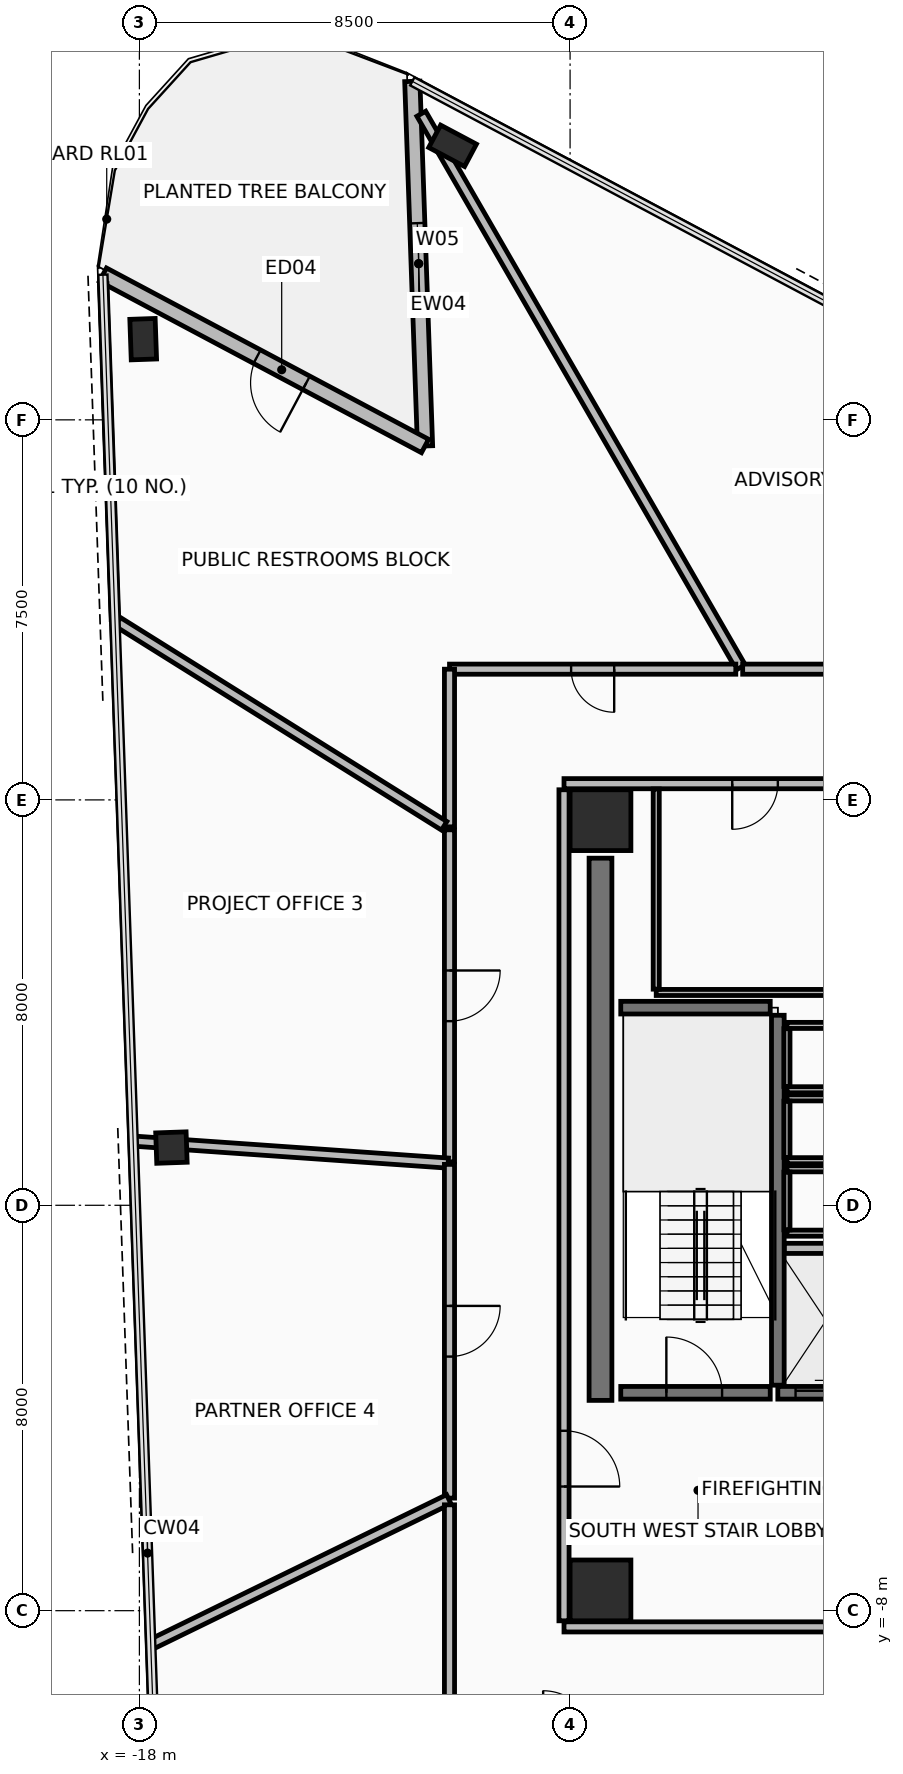
"""IFC4 building model, lengths in metres.
Left out: names, types, materials, properties, quantities, classifications, styles, units other than length and angle.
Written with IfcOpenShell. Run it as: python <this file> out.ifc"""

import sys

from ifc_helpers import new_model, si_unit, direction, frame, frame_2d, origin, origin_2d, place, context, subcontext, project, spatial, rectangle, hollow_rectangle, extrude, element, fill, save


model = new_model("IFC4")
c1 = context("Model", 3, precision=1e-05, world=origin(), true_north=direction((0.0, 1.0)))
c2 = subcontext(c1, "Body", "Model", "MODEL_VIEW")
j1 = project(units=[si_unit("LENGTHUNIT", "METRE"), si_unit("PLANEANGLEUNIT", "RADIAN")], contexts=[c1])
p1 = place(None, origin())
s1 = spatial("IfcSite", under=j1, at=p1, CompositionType="ELEMENT")
p2 = place(p1, origin())
s2 = spatial("IfcBuilding", under=s1, at=p2, CompositionType="ELEMENT")
p3 = place(p2, frame((0.0, 0.0, 149.6)))
s3 = spatial("IfcBuildingStorey", under=s2, at=p3, CompositionType="ELEMENT", Elevation=149.6)
for number, where, z_axis, x_axis in (
    (1, (-8.9, -7.6, 0.0), (0.0, 0.0, 1.0), (1.0, 0.0, 0.0)),
    (2, (-8.9, 7.6, 0.0), (0.0, 0.0, 1.0), (1.0, 0.0, 0.0)),
):
    element("IfcColumn", number, at=place(p3, frame(where, z_axis=z_axis, x_axis=x_axis)), inside=s3, PredefinedType="COLUMN", context=c2, shape_type="SweptSolid", body=[
        extrude(rectangle(XDim=1.2, YDim=1.2, at=origin_2d()), origin(), (0.0, 0.0, 1.0), 3.6),
    ])
p4 = place(p3, frame((-17.925, 17.092, 0.0), z_axis=(0.0, 0.0, 1.0), x_axis=(-0.034899496703, 0.999390827019, 0.0)))
e3 = element("IfcColumn", 3, at=p4, inside=s3, PredefinedType="COLUMN", context=c2, shape_type="SweptSolid", body=[
    extrude(hollow_rectangle(XDim=0.5, YDim=0.8, WallThickness=0.04, at=origin_2d()), origin(), (0.0, 0.0, 1.0), 3.6),
])
p5 = place(p3, frame((-17.368, 1.139, 0.0), z_axis=(0.0, 0.0, 1.0), x_axis=(-0.034899496703, 0.999390827019, 0.0)))
e4 = element("IfcColumn", 4, at=p5, inside=s3, PredefinedType="COLUMN", context=c2, shape_type="SweptSolid", body=[
    extrude(hollow_rectangle(XDim=0.6, YDim=0.6, WallThickness=0.036, at=origin_2d()), origin(), (0.0, 0.0, 1.0), 3.6),
])
p6 = place(p3, frame((-11.819, 20.908, 0.0), z_axis=(0.0, 0.0, 1.0), x_axis=(-0.88294841224, 0.469470021751, 0.0)))
e5 = element("IfcColumn", 5, at=p6, inside=s3, PredefinedType="COLUMN", context=c2, shape_type="SweptSolid", body=[
    extrude(hollow_rectangle(XDim=0.5, YDim=0.8, WallThickness=0.04, at=origin_2d()), origin(), (0.0, 0.0, 1.0), 3.6),
])
p7 = place(p3, frame((-12.614, 22.18, 0.0), z_axis=(0.0, 0.0, 1.0), x_axis=(0.034925918675, -0.999389903994, 0.0)))
e6 = element("IfcWall", 6, at=p7, inside=s3, PredefinedType="STANDARD", context=c2, shape_type="SweptSolid", body=[
    extrude(rectangle(XDim=7.2, YDim=0.3, at=frame_2d((3.6, 0.0))), origin(), (0.0, 0.0, 1.0), 2.705),
])
p8 = place(p7, frame((2.8, 0.0, 0.325)))
e7 = element("IfcOpeningElement", 7, at=p8, cuts=e6, PredefinedType="OPENING", context=c2, shape_type="SweptSolid", body=[
    extrude(rectangle(XDim=1.6, YDim=2.2, at=frame_2d((0.8, 1.1))), frame((0.0, 0.16, 0.0), z_axis=(0.0, -1.0, 0.0), x_axis=(1.0, 0.0, 0.0)), (0.0, 0.0, 1.0), 0.32),
])
p9 = place(p3, frame((-12.363, 14.984, 0.0), z_axis=(0.0, 0.0, 1.0), x_axis=(-0.882950149473, 0.469466754463, 0.0)))
e8 = element("IfcWall", 8, at=p9, inside=s3, PredefinedType="STANDARD", context=c2, shape_type="SweptSolid", body=[
    extrude(rectangle(XDim=7.2, YDim=0.3, at=frame_2d((3.6, 0.0))), origin(), (0.0, 0.0, 1.0), 2.705),
])
p10 = place(p9, frame((2.654, 0.0, 0.0)))
e9 = element("IfcOpeningElement", 9, at=p10, cuts=e8, PredefinedType="OPENING", context=c2, shape_type="SweptSolid", body=[
    extrude(rectangle(XDim=1.1, YDim=2.2, at=frame_2d((0.55, 1.1))), frame((0.0, 0.16, 0.0), z_axis=(0.0, -1.0, 0.0), x_axis=(1.0, 0.0, 0.0)), (0.0, 0.0, 1.0), 0.32),
])
p11 = place(p3, frame((-8.9, -3.85, 0.0), z_axis=(0.0, 0.0, 1.0), x_axis=(0.0, 1.0, 0.0)))
e10 = element("IfcWall", 10, at=p11, inside=s3, PredefinedType="SHEAR", context=c2, shape_type="SweptSolid", body=[
    extrude(rectangle(XDim=10.7, YDim=0.45, at=frame_2d((5.35, 0.0))), origin(), (0.0, 0.0, 1.0), 3.41),
])
p12 = place(p3, frame((-9.62, -8.32, 0.0), z_axis=(0.0, 0.0, 1.0), x_axis=(1.0, 0.0, 0.0)))
e11 = element("IfcWall", 11, at=p12, inside=s3, PredefinedType="PARTITIONING", context=c2, shape_type="SweptSolid", body=[
    extrude(rectangle(XDim=19.24, YDim=0.2, at=frame_2d((9.62, 0.0))), origin(), (0.0, 0.0, 1.0), 2.855),
])
p13 = place(p12, frame((7.37, 0.0, 0.0)))
e12 = element("IfcOpeningElement", 12, at=p13, cuts=e11, PredefinedType="OPENING", context=c2, shape_type="SweptSolid", body=[
    extrude(rectangle(XDim=0.9, YDim=2.1, at=frame_2d((0.45, 1.05))), frame((0.0, 0.11, 0.0), z_axis=(0.0, -1.0, 0.0), x_axis=(1.0, 0.0, 0.0)), (0.0, 0.0, 1.0), 0.22),
])
p14 = place(p12, frame((10.77, 0.0, 0.0)))
e13 = element("IfcOpeningElement", 13, at=p14, cuts=e11, PredefinedType="OPENING", context=c2, shape_type="SweptSolid", body=[
    extrude(rectangle(XDim=0.9, YDim=2.1, at=frame_2d((0.45, 1.05))), frame((0.0, 0.11, 0.0), z_axis=(0.0, -1.0, 0.0), x_axis=(1.0, 0.0, 0.0)), (0.0, 0.0, 1.0), 0.22),
])
p15 = place(p3, frame((9.62, 8.32, 0.0), z_axis=(0.0, 0.0, 1.0), x_axis=(-1.0, 0.0, 0.0)))
e14 = element("IfcWall", 14, at=p15, inside=s3, PredefinedType="PARTITIONING", context=c2, shape_type="SweptSolid", body=[
    extrude(rectangle(XDim=19.24, YDim=0.2, at=frame_2d((9.62, 0.0))), origin(), (0.0, 0.0, 1.0), 2.755),
])
p16 = place(p15, frame((15.02, 0.0, 0.0)))
e15 = element("IfcOpeningElement", 15, at=p16, cuts=e14, PredefinedType="OPENING", context=c2, shape_type="SweptSolid", body=[
    extrude(rectangle(XDim=0.9, YDim=2.1, at=frame_2d((0.45, 1.05))), frame((0.0, 0.11, 0.0), z_axis=(0.0, -1.0, 0.0), x_axis=(1.0, 0.0, 0.0)), (0.0, 0.0, 1.0), 0.22),
])
p17 = place(p3, frame((-9.62, 8.2, 0.0), z_axis=(0.0, 0.0, 1.0), x_axis=(0.0, -1.0, 0.0)))
e16 = element("IfcWall", 16, at=p17, inside=s3, PredefinedType="PARTITIONING", context=c2, shape_type="SweptSolid", body=[
    extrude(rectangle(XDim=16.4, YDim=0.2, at=frame_2d((8.2, 0.0))), origin(), (0.0, 0.0, 1.0), 2.855),
])
p18 = place(p17, frame((12.65, 0.0, 0.0)))
e17 = element("IfcOpeningElement", 17, at=p18, cuts=e16, PredefinedType="OPENING", context=c2, shape_type="SweptSolid", body=[
    extrude(rectangle(XDim=1.1, YDim=2.15, at=frame_2d((0.55, 1.075))), frame((0.0, 0.11, 0.0), z_axis=(0.0, -1.0, 0.0), x_axis=(1.0, 0.0, 0.0)), (0.0, 0.0, 1.0), 0.22),
])
p19 = place(p3, frame((-5.4, -3.55, 0.0), z_axis=(0.0, 0.0, 1.0), x_axis=(0.0, 1.0, 0.0)))
e18 = element("IfcWall", 18, at=p19, inside=s3, PredefinedType="SHEAR", context=c2, shape_type="SweptSolid", body=[
    extrude(rectangle(XDim=7.3, YDim=0.25, at=frame_2d((3.65, 0.0))), origin(), (0.0, 0.0, 1.0), 3.41),
])
p20 = place(p3, frame((-8.5, -3.7, 0.0), z_axis=(0.0, 0.0, 1.0), x_axis=(1.0, 0.0, 0.0)))
e19 = element("IfcWall", 19, at=p20, inside=s3, PredefinedType="SHEAR", context=c2, shape_type="SweptSolid", body=[
    extrude(rectangle(XDim=2.95, YDim=0.25, at=frame_2d((1.475, 0.0))), origin(), (0.0, 0.0, 1.0), 3.41),
])
p21 = place(p20, frame((0.9, 0.0, 0.0)))
e20 = element("IfcOpeningElement", 20, at=p21, cuts=e19, PredefinedType="OPENING", context=c2, shape_type="SweptSolid", body=[
    extrude(rectangle(XDim=1.1, YDim=2.15, at=frame_2d((0.55, 1.075))), frame((0.0, 0.135, 0.0), z_axis=(0.0, -1.0, 0.0), x_axis=(1.0, 0.0, 0.0)), (0.0, 0.0, 1.0), 0.27),
])
p22 = place(p3, frame((-8.5, 3.9, 0.0), z_axis=(0.0, 0.0, 1.0), x_axis=(1.0, 0.0, 0.0)))
e21 = element("IfcWall", 21, at=p22, inside=s3, PredefinedType="SHEAR", context=c2, shape_type="SweptSolid", body=[
    extrude(rectangle(XDim=2.95, YDim=0.25, at=frame_2d((1.475, 0.0))), origin(), (0.0, 0.0, 1.0), 3.41),
])
p23 = place(p3, frame((-5.4, -3.7, 0.0), z_axis=(0.0, 0.0, 1.0), x_axis=(1.0, 0.0, 0.0)))
e22 = element("IfcWall", 22, at=p23, inside=s3, PredefinedType="SHEAR", context=c2, shape_type="SweptSolid", body=[
    extrude(rectangle(XDim=1.9, YDim=0.25, at=frame_2d((0.95, 0.0))), origin(), (0.0, 0.0, 1.0), 3.41),
])
p24 = place(p23, frame((0.35, 0.0, 0.0)))
e23 = element("IfcOpeningElement", 23, at=p24, cuts=e22, PredefinedType="OPENING", context=c2, shape_type="SweptSolid", body=[
    extrude(rectangle(XDim=1.2, YDim=2.2, at=frame_2d((0.6, 1.1))), frame((0.0, 0.135, 0.0), z_axis=(0.0, -1.0, 0.0), x_axis=(1.0, 0.0, 0.0)), (0.0, 0.0, 1.0), 0.27),
])
p25 = place(p3, frame((-5.27, -0.85, 0.0), z_axis=(0.0, 0.0, 1.0), x_axis=(1.0, 0.0, 0.0)))
e24 = element("IfcWall", 24, at=p25, inside=s3, PredefinedType="PARTITIONING", context=c2, shape_type="SweptSolid", body=[
    extrude(rectangle(XDim=1.77, YDim=0.2, at=frame_2d((0.885, 0.0))), origin(), (0.0, 0.0, 1.0), 3.41),
])
p26 = place(p3, frame((-5.22, 2.28, 0.0), z_axis=(0.0, 0.0, 1.0), x_axis=(1.0, 0.0, 0.0)))
e25 = element("IfcWall", 25, at=p26, inside=s3, PredefinedType="PARTITIONING", context=c2, shape_type="SweptSolid", body=[
    extrude(rectangle(XDim=3.47, YDim=0.12, at=frame_2d((1.735, 0.0))), origin(), (0.0, 0.0, 1.0), 3.41),
])
p27 = place(p3, frame((-1.815, 3.55, 0.0), z_axis=(0.0, 0.0, 1.0), x_axis=(-1.0, 0.0, 0.0)))
e26 = element("IfcWall", 26, at=p27, inside=s3, PredefinedType="PARTITIONING", context=c2, shape_type="SweptSolid", body=[
    extrude(rectangle(XDim=3.405, YDim=0.12, at=frame_2d((1.703, 0.0))), origin(), (0.0, 0.0, 1.0), 3.41),
])
p28 = place(p3, frame((-5.22, 3.485, 0.0), z_axis=(0.0, 0.0, 1.0), x_axis=(0.0, -1.0, 0.0)))
e27 = element("IfcWall", 27, at=p28, inside=s3, PredefinedType="PARTITIONING", context=c2, shape_type="SweptSolid", body=[
    extrude(rectangle(XDim=1.14, YDim=0.12, at=frame_2d((0.57, 0.0))), origin(), (0.0, 0.0, 1.0), 3.41),
])
p29 = place(p3, frame((-5.22, 0.88, 0.0), z_axis=(0.0, 0.0, 1.0), x_axis=(1.0, 0.0, 0.0)))
e28 = element("IfcWall", 28, at=p29, inside=s3, PredefinedType="PARTITIONING", context=c2, shape_type="SweptSolid", body=[
    extrude(rectangle(XDim=3.47, YDim=0.12, at=frame_2d((1.735, 0.0))), origin(), (0.0, 0.0, 1.0), 3.41),
])
p30 = place(p3, frame((-1.815, 2.12, 0.0), z_axis=(0.0, 0.0, 1.0), x_axis=(-1.0, 0.0, 0.0)))
e29 = element("IfcWall", 29, at=p30, inside=s3, PredefinedType="PARTITIONING", context=c2, shape_type="SweptSolid", body=[
    extrude(rectangle(XDim=3.405, YDim=0.12, at=frame_2d((1.703, 0.0))), origin(), (0.0, 0.0, 1.0), 3.41),
])
p31 = place(p3, frame((-5.22, 2.055, 0.0), z_axis=(0.0, 0.0, 1.0), x_axis=(0.0, -1.0, 0.0)))
e30 = element("IfcWall", 30, at=p31, inside=s3, PredefinedType="PARTITIONING", context=c2, shape_type="SweptSolid", body=[
    extrude(rectangle(XDim=1.11, YDim=0.12, at=frame_2d((0.555, 0.0))), origin(), (0.0, 0.0, 1.0), 3.41),
])
p32 = place(p3, frame((-5.22, -0.55, 0.0), z_axis=(0.0, 0.0, 1.0), x_axis=(1.0, 0.0, 0.0)))
e31 = element("IfcWall", 31, at=p32, inside=s3, PredefinedType="PARTITIONING", context=c2, shape_type="SweptSolid", body=[
    extrude(rectangle(XDim=2.77, YDim=0.12, at=frame_2d((1.385, 0.0))), origin(), (0.0, 0.0, 1.0), 3.41),
])
p33 = place(p3, frame((-2.515, 0.72, 0.0), z_axis=(0.0, 0.0, 1.0), x_axis=(-1.0, 0.0, 0.0)))
e32 = element("IfcWall", 32, at=p33, inside=s3, PredefinedType="PARTITIONING", context=c2, shape_type="SweptSolid", body=[
    extrude(rectangle(XDim=2.705, YDim=0.12, at=frame_2d((1.353, 0.0))), origin(), (0.0, 0.0, 1.0), 3.41),
])
p34 = place(p3, frame((-5.22, 0.655, 0.0), z_axis=(0.0, 0.0, 1.0), x_axis=(0.0, -1.0, 0.0)))
e33 = element("IfcWall", 33, at=p34, inside=s3, PredefinedType="PARTITIONING", context=c2, shape_type="SweptSolid", body=[
    extrude(rectangle(XDim=1.14, YDim=0.12, at=frame_2d((0.57, 0.0))), origin(), (0.0, 0.0, 1.0), 3.41),
])
p35 = place(p3, frame((-7.8, 4.2, 0.0), z_axis=(0.0, 0.0, 1.0), x_axis=(1.0, 0.0, 0.0)))
e34 = element("IfcWall", 34, at=p35, inside=s3, PredefinedType="PARTITIONING", context=c2, shape_type="SweptSolid", body=[
    extrude(rectangle(XDim=3.9, YDim=0.12, at=frame_2d((1.95, 0.0))), origin(), (0.0, 0.0, 1.0), 3.41),
])
p36 = place(p3, frame((-7.8, 8.215, 0.0), z_axis=(0.0, 0.0, 1.0), x_axis=(0.0, -1.0, 0.0)))
e35 = element("IfcWall", 35, at=p36, inside=s3, PredefinedType="PARTITIONING", context=c2, shape_type="SweptSolid", body=[
    extrude(rectangle(XDim=3.95, YDim=0.12, at=frame_2d((1.975, 0.0))), origin(), (0.0, 0.0, 1.0), 2.605),
])
p37 = place(p3, frame((-12.437, 21.541, 0.0), z_axis=(0.0, 0.0, 1.0), x_axis=(0.500011201522, -0.866018936486, 0.0)))
e36 = element("IfcWall", 36, at=p37, inside=s3, PredefinedType="PARTITIONING", context=c2, shape_type="SweptSolid", body=[
    extrude(rectangle(XDim=12.613, YDim=0.2, at=frame_2d((6.307, 0.0))), origin(), (0.0, 0.0, 1.0), 2.705),
])
p38 = place(p3, frame((-6.229, 10.58, 0.0), z_axis=(0.0, 0.0, 1.0), x_axis=(-1.0, 0.0, 0.0)))
e37 = element("IfcWall", 37, at=p38, inside=s3, PredefinedType="PARTITIONING", context=c2, shape_type="SweptSolid", body=[
    extrude(rectangle(XDim=5.65, YDim=0.2, at=frame_2d((2.825, 0.0))), origin(), (0.0, 0.0, 1.0), 2.755),
])
p39 = place(p38, frame((2.4, 0.0, 0.0)))
e38 = element("IfcOpeningElement", 38, at=p39, cuts=e37, PredefinedType="OPENING", context=c2, shape_type="SweptSolid", body=[
    extrude(rectangle(XDim=0.85, YDim=2.1, at=frame_2d((0.425, 1.05))), frame((0.0, 0.11, 0.0), z_axis=(0.0, -1.0, 0.0), x_axis=(1.0, 0.0, 0.0)), (0.0, 0.0, 1.0), 0.22),
])
p40 = place(p3, frame((-11.88, 10.579, 0.0), z_axis=(0.0, 0.0, 1.0), x_axis=(0.0, -1.0, 0.0)))
e39 = element("IfcWall", 39, at=p40, inside=s3, PredefinedType="PARTITIONING", context=c2, shape_type="SweptSolid", body=[
    extrude(rectangle(XDim=3.111, YDim=0.2, at=frame_2d((1.555, 0.0))), origin(), (0.0, 0.0, 1.0), 2.855),
])
p41 = place(p3, frame((-11.985, 7.489, 0.0), z_axis=(0.0, 0.0, 1.0), x_axis=(-0.848034171939, 0.529941546988, 0.0)))
e40 = element("IfcWall", 40, at=p41, inside=s3, PredefinedType="PARTITIONING", context=c2, shape_type="SweptSolid", body=[
    extrude(rectangle(XDim=7.647, YDim=0.2, at=frame_2d((3.824, 0.0))), origin(), (0.0, 0.0, 1.0), 2.705),
])
p42 = place(p3, frame((-18.482, 11.562, 0.0), z_axis=(0.0, 0.0, 1.0), x_axis=(-0.034921554499, 0.9993900565, 0.0)))
e41 = element("IfcWall", 41, at=p42, inside=s3, PredefinedType="PARTITIONING", context=c2, shape_type="SweptSolid", body=[
    extrude(rectangle(XDim=6.628, YDim=0.15, at=frame_2d((3.314, 0.0))), origin(), (0.0, 0.0, 1.0), 3.41),
])
p43 = place(p3, frame((-0.395, 10.58, 0.0), z_axis=(0.0, 0.0, 1.0), x_axis=(-1.0, 0.0, 0.0)))
e42 = element("IfcWall", 42, at=p43, inside=s3, PredefinedType="PARTITIONING", context=c2, shape_type="SweptSolid", body=[
    extrude(rectangle(XDim=5.699, YDim=0.2, at=frame_2d((2.849, 0.0))), origin(), (0.0, 0.0, 1.0), 3.41),
])
p44 = place(p43, frame((2.349, 0.0, 0.0)))
e43 = element("IfcOpeningElement", 43, at=p44, cuts=e42, PredefinedType="OPENING", context=c2, shape_type="SweptSolid", body=[
    extrude(rectangle(XDim=1.0, YDim=2.15, at=frame_2d((0.5, 1.075))), frame((0.0, 0.11, 0.0), z_axis=(0.0, -1.0, 0.0), x_axis=(1.0, 0.0, 0.0)), (0.0, 0.0, 1.0), 0.22),
])
p45 = place(p3, frame((-11.88, 7.41, 0.0), z_axis=(0.0, 0.0, 1.0), x_axis=(0.0, -1.0, 0.0)))
e44 = element("IfcWall", 44, at=p45, inside=s3, PredefinedType="PARTITIONING", context=c2, shape_type="SweptSolid", body=[
    extrude(rectangle(XDim=6.552, YDim=0.2, at=frame_2d((3.276, 0.0))), origin(), (0.0, 0.0, 1.0), 2.855),
])
p46 = place(p45, frame((2.776, 0.0, 0.0)))
e45 = element("IfcOpeningElement", 45, at=p46, cuts=e44, PredefinedType="OPENING", context=c2, shape_type="SweptSolid", body=[
    extrude(rectangle(XDim=1.0, YDim=2.15, at=frame_2d((0.5, 1.075))), frame((0.0, 0.11, 0.0), z_axis=(0.0, -1.0, 0.0), x_axis=(1.0, 0.0, 0.0)), (0.0, 0.0, 1.0), 0.22),
])
p47 = place(p3, frame((-11.907, 0.833, 0.0), z_axis=(0.0, 0.0, 1.0), x_axis=(-0.997563977179, 0.069757518842, 0.0)))
e46 = element("IfcWall", 46, at=p47, inside=s3, PredefinedType="PARTITIONING", context=c2, shape_type="SweptSolid", body=[
    extrude(rectangle(XDim=6.209, YDim=0.2, at=frame_2d((3.104, 0.0))), origin(), (0.0, 0.0, 1.0), 2.705),
])
p48 = place(p3, frame((-11.88, 0.807, 0.0), z_axis=(0.0, 0.0, 1.0), x_axis=(0.0, -1.0, 0.0)))
e47 = element("IfcWall", 47, at=p48, inside=s3, PredefinedType="PARTITIONING", context=c2, shape_type="SweptSolid", body=[
    extrude(rectangle(XDim=6.586, YDim=0.2, at=frame_2d((3.293, 0.0))), origin(), (0.0, 0.0, 1.0), 3.41),
])
p49 = place(p48, frame((2.793, 0.0, 0.0)))
e48 = element("IfcOpeningElement", 48, at=p49, cuts=e47, PredefinedType="OPENING", context=c2, shape_type="SweptSolid", body=[
    extrude(rectangle(XDim=1.0, YDim=2.15, at=frame_2d((0.5, 1.075))), frame((0.0, 0.11, 0.0), z_axis=(0.0, -1.0, 0.0), x_axis=(1.0, 0.0, 0.0)), (0.0, 0.0, 1.0), 0.22),
])
p50 = place(p3, frame((-11.894, -5.801, 0.0), z_axis=(0.0, 0.0, 1.0), x_axis=(-0.89877884349, -0.438402315796, 0.0)))
e49 = element("IfcWall", 49, at=p50, inside=s3, PredefinedType="PARTITIONING", context=c2, shape_type="SweptSolid", body=[
    extrude(rectangle(XDim=6.544, YDim=0.2, at=frame_2d((3.272, 0.0))), origin(), (0.0, 0.0, 1.0), 2.705),
])
p51 = place(p3, frame((-11.88, -5.911, 0.0), z_axis=(0.0, 0.0, 1.0), x_axis=(0.0, -1.0, 0.0)))
e50 = element("IfcWall", 50, at=p51, inside=s3, PredefinedType="PARTITIONING", context=c2, shape_type="SweptSolid", body=[
    extrude(rectangle(XDim=4.668, YDim=0.2, at=frame_2d((2.334, 0.0))), origin(), (0.0, 0.0, 1.0), 2.855),
])
p52 = place(p10, origin())
e51 = element("IfcDoor", 51, at=p52, inside=s3, OperationType="SINGLE_SWING_LEFT", PredefinedType="DOOR", context=c2, shape_type="SweptSolid", body=[
    extrude(rectangle(XDim=1.1, YDim=2.2, at=frame_2d((0.55, 1.1))), frame((0.0, 0.025, 0.0), z_axis=(0.0, -1.0, 0.0), x_axis=(1.0, 0.0, 0.0)), (0.0, 0.0, 1.0), 0.05),
])
fill(e9, e51)
p53 = place(p8, origin())
e52 = element("IfcWindow", 52, at=p53, inside=s3, PartitioningType="SINGLE_PANEL", PredefinedType="WINDOW", context=c2, shape_type="SweptSolid", body=[
    extrude(rectangle(XDim=1.6, YDim=2.2, at=frame_2d((0.8, 1.1))), frame((0.0, 0.03, 0.0), z_axis=(0.0, -1.0, 0.0), x_axis=(1.0, 0.0, 0.0)), (0.0, 0.0, 1.0), 0.06),
])
fill(e7, e52)
p54 = place(p18, frame((1.1, 0.0, 0.0), z_axis=(0.0, 0.0, 1.0), x_axis=(-1.0, 0.0, 0.0)))
e53 = element("IfcDoor", 53, at=p54, inside=s3, OperationType="SINGLE_SWING_LEFT", PredefinedType="DOOR", context=c2, shape_type="SweptSolid", body=[
    extrude(rectangle(XDim=1.1, YDim=2.15, at=frame_2d((0.55, 1.075))), frame((0.0, 0.025, 0.0), z_axis=(0.0, -1.0, 0.0), x_axis=(1.0, 0.0, 0.0)), (0.0, 0.0, 1.0), 0.05),
])
fill(e17, e53)
p55 = place(p21, origin())
e54 = element("IfcDoor", 54, at=p55, inside=s3, OperationType="SINGLE_SWING_LEFT", PredefinedType="DOOR", context=c2, shape_type="SweptSolid", body=[
    extrude(rectangle(XDim=1.1, YDim=2.15, at=frame_2d((0.55, 1.075))), frame((0.0, 0.025, 0.0), z_axis=(0.0, -1.0, 0.0), x_axis=(1.0, 0.0, 0.0)), (0.0, 0.0, 1.0), 0.05),
])
fill(e20, e54)
p56 = place(p24, origin())
e55 = element("IfcDoor", 55, at=p56, inside=s3, OperationType="SLIDING_TO_RIGHT", PredefinedType="DOOR", context=c2, shape_type="SweptSolid", body=[
    extrude(rectangle(XDim=1.2, YDim=2.2, at=frame_2d((0.6, 1.1))), frame((0.0, 0.025, 0.0), z_axis=(0.0, -1.0, 0.0), x_axis=(1.0, 0.0, 0.0)), (0.0, 0.0, 1.0), 0.05),
])
fill(e23, e55)
p57 = place(p16, frame((0.9, 0.0, 0.0), z_axis=(0.0, 0.0, 1.0), x_axis=(-1.0, 0.0, 0.0)))
e56 = element("IfcDoor", 56, at=p57, inside=s3, OperationType="SINGLE_SWING_LEFT", PredefinedType="DOOR", context=c2, shape_type="SweptSolid", body=[
    extrude(rectangle(XDim=0.9, YDim=2.1, at=frame_2d((0.45, 1.05))), frame((0.0, 0.025, 0.0), z_axis=(0.0, -1.0, 0.0), x_axis=(1.0, 0.0, 0.0)), (0.0, 0.0, 1.0), 0.05),
])
fill(e15, e56)
p58 = place(p39, origin())
e57 = element("IfcDoor", 57, at=p58, inside=s3, OperationType="SINGLE_SWING_RIGHT", PredefinedType="DOOR", context=c2, shape_type="SweptSolid", body=[
    extrude(rectangle(XDim=0.85, YDim=2.1, at=frame_2d((0.425, 1.05))), frame((0.0, 0.025, 0.0), z_axis=(0.0, -1.0, 0.0), x_axis=(1.0, 0.0, 0.0)), (0.0, 0.0, 1.0), 0.05),
])
fill(e38, e57)
p59 = place(p46, origin())
e58 = element("IfcDoor", 58, at=p59, inside=s3, OperationType="SINGLE_SWING_RIGHT", PredefinedType="DOOR", context=c2, shape_type="SweptSolid", body=[
    extrude(rectangle(XDim=1.0, YDim=2.15, at=frame_2d((0.5, 1.075))), frame((0.0, 0.025, 0.0), z_axis=(0.0, -1.0, 0.0), x_axis=(1.0, 0.0, 0.0)), (0.0, 0.0, 1.0), 0.05),
])
fill(e45, e58)
p60 = place(p49, origin())
e59 = element("IfcDoor", 59, at=p60, inside=s3, OperationType="SINGLE_SWING_RIGHT", PredefinedType="DOOR", context=c2, shape_type="SweptSolid", body=[
    extrude(rectangle(XDim=1.0, YDim=2.15, at=frame_2d((0.5, 1.075))), frame((0.0, 0.025, 0.0), z_axis=(0.0, -1.0, 0.0), x_axis=(1.0, 0.0, 0.0)), (0.0, 0.0, 1.0), 0.05),
])
fill(e48, e59)
save(model, sys.argv[1])
